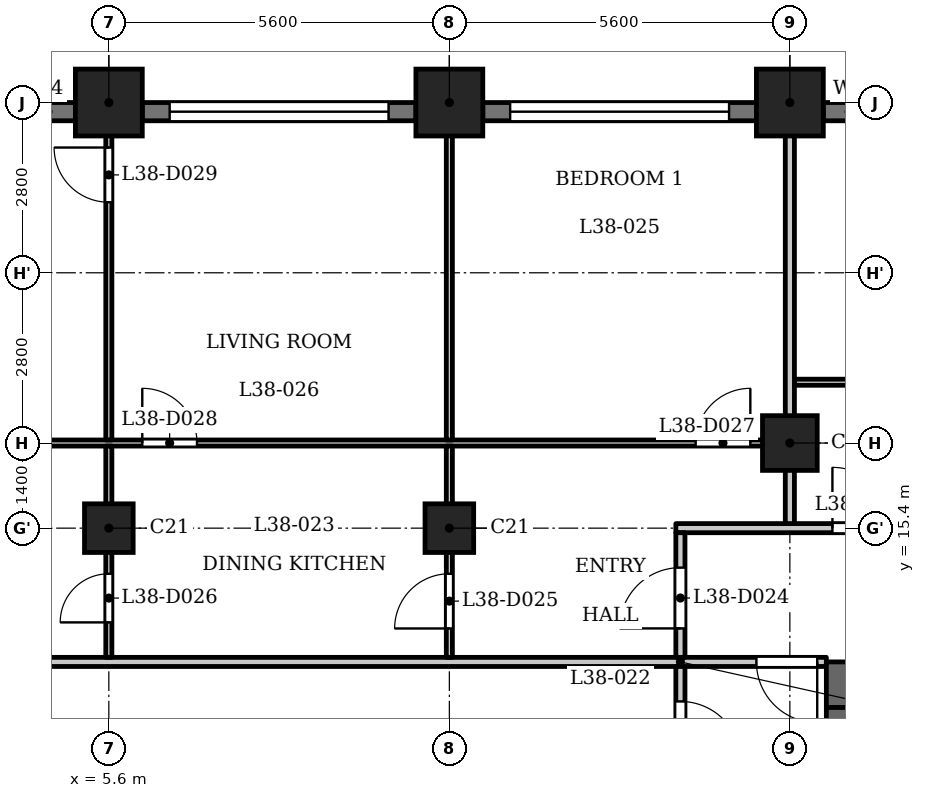
"""IFC4 building model, lengths in metres.
Left out: names, types, materials, properties, quantities, classifications, styles, units other than length and angle.
Written with IfcOpenShell. Run it as: python <this file> out.ifc"""

import sys

from ifc_helpers import new_model, si_unit, direction, frame, frame_2d, origin, origin_2d, place, context, subcontext, project, spatial, rectangle, extrude, element, fill, save


model = new_model("IFC4")
c1 = context("Model", 3, precision=1e-05, world=origin(), true_north=direction((0.0, 1.0)))
c2 = subcontext(c1, "Body", "Model", "MODEL_VIEW")
j1 = project(units=[si_unit("LENGTHUNIT", "METRE"), si_unit("PLANEANGLEUNIT", "RADIAN")], contexts=[c1])
p1 = place(None, origin())
s1 = spatial("IfcSite", under=j1, at=p1, CompositionType="ELEMENT")
p2 = place(p1, origin())
s2 = spatial("IfcBuilding", under=s1, at=p2, CompositionType="ELEMENT")
p3 = place(p2, frame((0.0, 0.0, 150.1)))
s3 = spatial("IfcBuildingStorey", under=s2, at=p3, CompositionType="ELEMENT", Elevation=150.1)
for number, where, z_axis, x_axis in (
    (1, (16.8, 22.4, 0.0), (0.0, 0.0, 1.0), (1.0, 0.0, 0.0)),
    (2, (11.2, 22.4, 0.0), (0.0, 0.0, 1.0), (1.0, 0.0, 0.0)),
    (3, (5.6, 22.4, 0.0), (0.0, 0.0, 1.0), (1.0, 0.0, 0.0)),
):
    element("IfcColumn", number, at=place(p3, frame(where, z_axis=z_axis, x_axis=x_axis)), inside=s3, PredefinedType="COLUMN", context=c2, shape_type="SweptSolid", body=[
        extrude(rectangle(XDim=1.1, YDim=1.1, at=origin_2d()), origin(), (0.0, 0.0, 1.0), 3.5),
    ])
p4 = place(p3, frame((16.8, 16.8, 0.0), z_axis=(0.0, 0.0, 1.0), x_axis=(1.0, 0.0, 0.0)))
e4 = element("IfcColumn", 4, at=p4, inside=s3, PredefinedType="COLUMN", context=c2, shape_type="SweptSolid", body=[
    extrude(rectangle(XDim=0.9, YDim=0.9, at=origin_2d()), origin(), (0.0, 0.0, 1.0), 3.5),
])
for number, where, z_axis, x_axis in (
    (5, (5.6, 15.4, 0.0), (0.0, 0.0, 1.0), (1.0, 0.0, 0.0)),
    (6, (11.2, 15.4, 0.0), (0.0, 0.0, 1.0), (1.0, 0.0, 0.0)),
):
    element("IfcColumn", number, at=place(p3, frame(where, z_axis=z_axis, x_axis=x_axis)), inside=s3, PredefinedType="COLUMN", context=c2, shape_type="SweptSolid", body=[
        extrude(rectangle(XDim=0.8, YDim=0.8, at=origin_2d()), origin(), (0.0, 0.0, 1.0), 3.5),
    ])
p5 = place(p3, frame((20.0, 22.25, 0.0), z_axis=(0.0, 0.0, 1.0), x_axis=(-1.0, 0.0, 0.0)))
e7 = element("IfcWall", 7, at=p5, inside=s3, PredefinedType="SOLIDWALL", context=c2, shape_type="SweptSolid", body=[
    extrude(rectangle(XDim=2.65, YDim=0.3, at=frame_2d((1.325, 0.0))), origin(), (0.0, 0.0, 1.0), 2.45),
])
p6 = place(p5, frame((0.425, 0.0, 0.9)))
e8 = element("IfcOpeningElement", 8, at=p6, cuts=e7, PredefinedType="OPENING", context=c2, shape_type="SweptSolid", body=[
    extrude(rectangle(XDim=1.8, YDim=1.25, at=frame_2d((0.9, 0.625))), frame((0.0, 0.16, 0.0), z_axis=(0.0, -1.0, 0.0), x_axis=(1.0, 0.0, 0.0)), (0.0, 0.0, 1.0), 0.32),
])
p7 = place(p3, frame((16.25, 22.25, 0.0), z_axis=(0.0, 0.0, 1.0), x_axis=(-1.0, 0.0, 0.0)))
e9 = element("IfcWall", 9, at=p7, inside=s3, PredefinedType="SOLIDWALL", context=c2, shape_type="SweptSolid", body=[
    extrude(rectangle(XDim=4.5, YDim=0.3, at=frame_2d((2.25, 0.0))), origin(), (0.0, 0.0, 1.0), 2.45),
])
p8 = place(p7, frame((0.45, 0.0, 1.2)))
e10 = element("IfcOpeningElement", 10, at=p8, cuts=e9, PredefinedType="OPENING", context=c2, shape_type="SweptSolid", body=[
    extrude(rectangle(XDim=3.6, YDim=0.95, at=frame_2d((1.8, 0.475))), frame((0.0, 0.16, 0.0), z_axis=(0.0, -1.0, 0.0), x_axis=(1.0, 0.0, 0.0)), (0.0, 0.0, 1.0), 0.32),
])
p9 = place(p3, frame((10.65, 22.25, 0.0), z_axis=(0.0, 0.0, 1.0), x_axis=(-1.0, 0.0, 0.0)))
e11 = element("IfcWall", 11, at=p9, inside=s3, PredefinedType="SOLIDWALL", context=c2, shape_type="SweptSolid", body=[
    extrude(rectangle(XDim=4.5, YDim=0.3, at=frame_2d((2.25, 0.0))), origin(), (0.0, 0.0, 1.0), 2.45),
])
p10 = place(p9, frame((0.45, 0.0, 1.2)))
e12 = element("IfcOpeningElement", 12, at=p10, cuts=e11, PredefinedType="OPENING", context=c2, shape_type="SweptSolid", body=[
    extrude(rectangle(XDim=3.6, YDim=0.95, at=frame_2d((1.8, 0.475))), frame((0.0, 0.16, 0.0), z_axis=(0.0, -1.0, 0.0), x_axis=(1.0, 0.0, 0.0)), (0.0, 0.0, 1.0), 0.32),
])
p11 = place(p3, frame((5.05, 22.25, 0.0), z_axis=(0.0, 0.0, 1.0), x_axis=(-1.0, 0.0, 0.0)))
e13 = element("IfcWall", 13, at=p11, inside=s3, PredefinedType="SOLIDWALL", context=c2, shape_type="SweptSolid", body=[
    extrude(rectangle(XDim=4.5, YDim=0.3, at=frame_2d((2.25, 0.0))), origin(), (0.0, 0.0, 1.0), 2.45),
])
p12 = place(p11, frame((0.45, 0.0, 1.2)))
e14 = element("IfcOpeningElement", 14, at=p12, cuts=e13, PredefinedType="OPENING", context=c2, shape_type="SweptSolid", body=[
    extrude(rectangle(XDim=3.6, YDim=0.95, at=frame_2d((1.8, 0.475))), frame((0.0, 0.16, 0.0), z_axis=(0.0, -1.0, 0.0), x_axis=(1.0, 0.0, 0.0)), (0.0, 0.0, 1.0), 0.32),
])
p13 = place(p3, frame((17.4, 12.825, 0.0), z_axis=(0.0, 0.0, 1.0), x_axis=(1.0, 0.0, 0.0)))
e15 = element("IfcWall", 15, at=p13, inside=s3, PredefinedType="SHEAR", context=c2, shape_type="SweptSolid", body=[
    extrude(rectangle(XDim=10.4, YDim=0.75, at=frame_2d((5.2, 0.0))), origin(), (0.0, 0.0, 1.0), 3.2),
])
p14 = place(p3, frame((17.6, -12.45, 0.0), z_axis=(0.0, 0.0, 1.0), x_axis=(0.0, 1.0, 0.0)))
e16 = element("IfcWall", 16, at=p14, inside=s3, PredefinedType="SHEAR", context=c2, shape_type="SweptSolid", body=[
    extrude(rectangle(XDim=24.9, YDim=0.4, at=frame_2d((12.45, 0.0))), origin(), (0.0, 0.0, 1.0), 3.2),
])
p15 = place(p14, frame((6.325, 0.0, 0.0)))
e17 = element("IfcOpeningElement", 17, at=p15, cuts=e16, PredefinedType="OPENING", context=c2, shape_type="SweptSolid", body=[
    extrude(rectangle(XDim=0.9, YDim=2.1, at=frame_2d((0.45, 1.05))), frame((0.0, 0.21, 0.0), z_axis=(0.0, -1.0, 0.0), x_axis=(1.0, 0.0, 0.0)), (0.0, 0.0, 1.0), 0.42),
])
p16 = place(p14, frame((9.925, 0.0, 0.0)))
e18 = element("IfcOpeningElement", 18, at=p16, cuts=e16, PredefinedType="OPENING", context=c2, shape_type="SweptSolid", body=[
    extrude(rectangle(XDim=0.9, YDim=2.1, at=frame_2d((0.45, 1.05))), frame((0.0, 0.21, 0.0), z_axis=(0.0, -1.0, 0.0), x_axis=(1.0, 0.0, 0.0)), (0.0, 0.0, 1.0), 0.42),
])
p17 = place(p14, frame((15.6, 0.0, 0.0)))
e19 = element("IfcOpeningElement", 19, at=p17, cuts=e16, PredefinedType="OPENING", context=c2, shape_type="SweptSolid", body=[
    extrude(rectangle(XDim=1.1, YDim=2.1, at=frame_2d((0.55, 1.05))), frame((0.0, 0.21, 0.0), z_axis=(0.0, -1.0, 0.0), x_axis=(1.0, 0.0, 0.0)), (0.0, 0.0, 1.0), 0.42),
])
p18 = place(p14, frame((18.0, 0.0, 0.0)))
e20 = element("IfcOpeningElement", 20, at=p18, cuts=e16, PredefinedType="OPENING", context=c2, shape_type="SweptSolid", body=[
    extrude(rectangle(XDim=1.1, YDim=2.1, at=frame_2d((0.55, 1.05))), frame((0.0, 0.21, 0.0), z_axis=(0.0, -1.0, 0.0), x_axis=(1.0, 0.0, 0.0)), (0.0, 0.0, 1.0), 0.42),
])
p19 = place(p14, frame((23.025, 0.0, 0.0)))
e21 = element("IfcOpeningElement", 21, at=p19, cuts=e16, PredefinedType="OPENING", context=c2, shape_type="SweptSolid", body=[
    extrude(rectangle(XDim=1.1, YDim=2.1, at=frame_2d((0.55, 1.05))), frame((0.0, 0.21, 0.0), z_axis=(0.0, -1.0, 0.0), x_axis=(1.0, 0.0, 0.0)), (0.0, 0.0, 1.0), 0.42),
])
p20 = place(p14, frame((0.775, 0.0, 0.0)))
e22 = element("IfcOpeningElement", 22, at=p20, cuts=e16, PredefinedType="OPENING", context=c2, shape_type="SweptSolid", body=[
    extrude(rectangle(XDim=1.1, YDim=2.1, at=frame_2d((0.55, 1.05))), frame((0.0, 0.21, 0.0), z_axis=(0.0, -1.0, 0.0), x_axis=(1.0, 0.0, 0.0)), (0.0, 0.0, 1.0), 0.42),
])
p21 = place(p14, frame((12.925, 0.0, 0.0)))
e23 = element("IfcOpeningElement", 23, at=p21, cuts=e16, PredefinedType="OPENING", context=c2, shape_type="SweptSolid", body=[
    extrude(rectangle(XDim=1.8, YDim=2.1, at=frame_2d((0.9, 1.05))), frame((0.0, 0.21, 0.0), z_axis=(0.0, -1.0, 0.0), x_axis=(1.0, 0.0, 0.0)), (0.0, 0.0, 1.0), 0.42),
])
p22 = place(p3, frame((-17.4, 13.2, 0.0), z_axis=(0.0, 0.0, 1.0), x_axis=(1.0, 0.0, 0.0)))
e24 = element("IfcWall", 24, at=p22, inside=s3, PredefinedType="PARTITIONING", context=c2, shape_type="SweptSolid", body=[
    extrude(rectangle(XDim=34.8, YDim=0.15, at=frame_2d((17.4, 0.0))), origin(), (0.0, 0.0, 1.0), 3.2),
])
p23 = place(p22, frame((0.25, 0.0, 0.0)))
e25 = element("IfcOpeningElement", 25, at=p23, cuts=e24, PredefinedType="OPENING", context=c2, shape_type="SweptSolid", body=[
    extrude(rectangle(XDim=1.0, YDim=2.1, at=frame_2d((0.5, 1.05))), frame((0.0, 0.085, 0.0), z_axis=(0.0, -1.0, 0.0), x_axis=(1.0, 0.0, 0.0)), (0.0, 0.0, 1.0), 0.17),
])
p24 = place(p22, frame((33.65, 0.0, 0.0)))
e26 = element("IfcOpeningElement", 26, at=p24, cuts=e24, PredefinedType="OPENING", context=c2, shape_type="SweptSolid", body=[
    extrude(rectangle(XDim=1.0, YDim=2.1, at=frame_2d((0.5, 1.05))), frame((0.0, 0.085, 0.0), z_axis=(0.0, -1.0, 0.0), x_axis=(1.0, 0.0, 0.0)), (0.0, 0.0, 1.0), 0.17),
])
p25 = place(p22, frame((13.75, 0.0, 0.0)))
e27 = element("IfcOpeningElement", 27, at=p25, cuts=e24, PredefinedType="OPENING", context=c2, shape_type="SweptSolid", body=[
    extrude(rectangle(XDim=1.0, YDim=2.1, at=frame_2d((0.5, 1.05))), frame((0.0, 0.085, 0.0), z_axis=(0.0, -1.0, 0.0), x_axis=(1.0, 0.0, 0.0)), (0.0, 0.0, 1.0), 0.17),
])
p26 = place(p3, frame((14.925, 15.4, 0.0), z_axis=(0.0, 0.0, 1.0), x_axis=(1.0, 0.0, 0.0)))
e28 = element("IfcWall", 28, at=p26, inside=s3, PredefinedType="PARTITIONING", context=c2, shape_type="SweptSolid", body=[
    extrude(rectangle(XDim=12.559, YDim=0.15, at=frame_2d((6.279, 0.0))), origin(), (0.0, 0.0, 1.0), 3.2),
])
p27 = place(p26, frame((2.575, 0.0, 0.0)))
e29 = element("IfcOpeningElement", 29, at=p27, cuts=e28, PredefinedType="OPENING", context=c2, shape_type="SweptSolid", body=[
    extrude(rectangle(XDim=1.0, YDim=2.1, at=frame_2d((0.5, 1.05))), frame((0.0, 0.085, 0.0), z_axis=(0.0, -1.0, 0.0), x_axis=(1.0, 0.0, 0.0)), (0.0, 0.0, 1.0), 0.17),
])
p28 = place(p3, frame((-16.725, 16.8, 0.0), z_axis=(0.0, 0.0, 1.0), x_axis=(1.0, 0.0, 0.0)))
e30 = element("IfcWall", 30, at=p28, inside=s3, PredefinedType="PARTITIONING", context=c2, shape_type="SweptSolid", body=[
    extrude(rectangle(XDim=33.45, YDim=0.1, at=frame_2d((16.725, 0.0))), origin(), (0.0, 0.0, 1.0), 3.2),
])
p29 = place(p28, frame((9.575, 0.0, 0.0)))
e31 = element("IfcOpeningElement", 31, at=p29, cuts=e30, PredefinedType="OPENING", context=c2, shape_type="SweptSolid", body=[
    extrude(rectangle(XDim=0.8, YDim=2.1, at=frame_2d((0.4, 1.05))), frame((0.0, 0.06, 0.0), z_axis=(0.0, -1.0, 0.0), x_axis=(1.0, 0.0, 0.0)), (0.0, 0.0, 1.0), 0.12),
])
p30 = place(p28, frame((6.125, 0.0, 0.0)))
e32 = element("IfcOpeningElement", 32, at=p30, cuts=e30, PredefinedType="OPENING", context=c2, shape_type="SweptSolid", body=[
    extrude(rectangle(XDim=0.9, YDim=2.1, at=frame_2d((0.45, 1.05))), frame((0.0, 0.06, 0.0), z_axis=(0.0, -1.0, 0.0), x_axis=(1.0, 0.0, 0.0)), (0.0, 0.0, 1.0), 0.12),
])
p31 = place(p28, frame((0.975, 0.0, 0.0)))
e33 = element("IfcOpeningElement", 33, at=p31, cuts=e30, PredefinedType="OPENING", context=c2, shape_type="SweptSolid", body=[
    extrude(rectangle(XDim=0.9, YDim=2.1, at=frame_2d((0.45, 1.05))), frame((0.0, 0.06, 0.0), z_axis=(0.0, -1.0, 0.0), x_axis=(1.0, 0.0, 0.0)), (0.0, 0.0, 1.0), 0.12),
])
p32 = place(p28, frame((3.225, 0.0, 0.0)))
e34 = element("IfcOpeningElement", 34, at=p32, cuts=e30, PredefinedType="OPENING", context=c2, shape_type="SweptSolid", body=[
    extrude(rectangle(XDim=0.9, YDim=2.1, at=frame_2d((0.45, 1.05))), frame((0.0, 0.06, 0.0), z_axis=(0.0, -1.0, 0.0), x_axis=(1.0, 0.0, 0.0)), (0.0, 0.0, 1.0), 0.12),
])
p33 = place(p28, frame((15.375, 0.0, 0.0)))
e35 = element("IfcOpeningElement", 35, at=p33, cuts=e30, PredefinedType="OPENING", context=c2, shape_type="SweptSolid", body=[
    extrude(rectangle(XDim=0.8, YDim=2.1, at=frame_2d((0.4, 1.05))), frame((0.0, 0.06, 0.0), z_axis=(0.0, -1.0, 0.0), x_axis=(1.0, 0.0, 0.0)), (0.0, 0.0, 1.0), 0.12),
])
p34 = place(p28, frame((13.175, 0.0, 0.0)))
e36 = element("IfcOpeningElement", 36, at=p34, cuts=e30, PredefinedType="OPENING", context=c2, shape_type="SweptSolid", body=[
    extrude(rectangle(XDim=0.9, YDim=2.1, at=frame_2d((0.45, 1.05))), frame((0.0, 0.06, 0.0), z_axis=(0.0, -1.0, 0.0), x_axis=(1.0, 0.0, 0.0)), (0.0, 0.0, 1.0), 0.12),
])
p35 = place(p28, frame((31.975, 0.0, 0.0)))
e37 = element("IfcOpeningElement", 37, at=p35, cuts=e30, PredefinedType="OPENING", context=c2, shape_type="SweptSolid", body=[
    extrude(rectangle(XDim=0.9, YDim=2.1, at=frame_2d((0.45, 1.05))), frame((0.0, 0.06, 0.0), z_axis=(0.0, -1.0, 0.0), x_axis=(1.0, 0.0, 0.0)), (0.0, 0.0, 1.0), 0.12),
])
p36 = place(p28, frame((22.875, 0.0, 0.0)))
e38 = element("IfcOpeningElement", 38, at=p36, cuts=e30, PredefinedType="OPENING", context=c2, shape_type="SweptSolid", body=[
    extrude(rectangle(XDim=0.9, YDim=2.1, at=frame_2d((0.45, 1.05))), frame((0.0, 0.06, 0.0), z_axis=(0.0, -1.0, 0.0), x_axis=(1.0, 0.0, 0.0)), (0.0, 0.0, 1.0), 0.12),
])
p37 = place(p3, frame((16.875, 17.8, 0.0), z_axis=(0.0, 0.0, 1.0), x_axis=(1.0, 0.0, 0.0)))
e39 = element("IfcWall", 39, at=p37, inside=s3, PredefinedType="PARTITIONING", context=c2, shape_type="SweptSolid", body=[
    extrude(rectangle(XDim=9.519, YDim=0.1, at=frame_2d((4.76, 0.0))), origin(), (0.0, 0.0, 1.0), 3.2),
])
p38 = place(p37, frame((6.175, 0.0, 0.0)))
e40 = element("IfcOpeningElement", 40, at=p38, cuts=e39, PredefinedType="OPENING", context=c2, shape_type="SweptSolid", body=[
    extrude(rectangle(XDim=0.8, YDim=2.1, at=frame_2d((0.4, 1.05))), frame((0.0, 0.06, 0.0), z_axis=(0.0, -1.0, 0.0), x_axis=(1.0, 0.0, 0.0)), (0.0, 0.0, 1.0), 0.12),
])
p39 = place(p37, frame((1.725, 0.0, 0.0)))
e41 = element("IfcOpeningElement", 41, at=p39, cuts=e39, PredefinedType="OPENING", context=c2, shape_type="SweptSolid", body=[
    extrude(rectangle(XDim=0.9, YDim=2.1, at=frame_2d((0.45, 1.05))), frame((0.0, 0.06, 0.0), z_axis=(0.0, -1.0, 0.0), x_axis=(1.0, 0.0, 0.0)), (0.0, 0.0, 1.0), 0.12),
])
p40 = place(p3, frame((5.6, 13.275, 0.0), z_axis=(0.0, 0.0, 1.0), x_axis=(0.0, 1.0, 0.0)))
e42 = element("IfcWall", 42, at=p40, inside=s3, PredefinedType="PARTITIONING", context=c2, shape_type="SweptSolid", body=[
    extrude(rectangle(XDim=3.475, YDim=0.1, at=frame_2d((1.738, 0.0))), origin(), (0.0, 0.0, 1.0), 3.2),
])
p41 = place(p40, frame((0.575, 0.0, 0.0)))
e43 = element("IfcOpeningElement", 43, at=p41, cuts=e42, PredefinedType="OPENING", context=c2, shape_type="SweptSolid", body=[
    extrude(rectangle(XDim=0.8, YDim=2.1, at=frame_2d((0.4, 1.05))), frame((0.0, 0.06, 0.0), z_axis=(0.0, -1.0, 0.0), x_axis=(1.0, 0.0, 0.0)), (0.0, 0.0, 1.0), 0.12),
])
p42 = place(p3, frame((5.6, 16.85, 0.0), z_axis=(0.0, 0.0, 1.0), x_axis=(0.0, 1.0, 0.0)))
e44 = element("IfcWall", 44, at=p42, inside=s3, PredefinedType="PARTITIONING", context=c2, shape_type="SweptSolid", body=[
    extrude(rectangle(XDim=6.08, YDim=0.1, at=frame_2d((3.04, 0.0))), origin(), (0.0, 0.0, 1.0), 3.2),
])
p43 = place(p42, frame((3.91, 0.0, 0.0)))
e45 = element("IfcOpeningElement", 45, at=p43, cuts=e44, PredefinedType="OPENING", context=c2, shape_type="SweptSolid", body=[
    extrude(rectangle(XDim=0.9, YDim=2.1, at=frame_2d((0.45, 1.05))), frame((0.0, 0.06, 0.0), z_axis=(0.0, -1.0, 0.0), x_axis=(1.0, 0.0, 0.0)), (0.0, 0.0, 1.0), 0.12),
])
p44 = place(p3, frame((11.2, 13.275, 0.0), z_axis=(0.0, 0.0, 1.0), x_axis=(0.0, 1.0, 0.0)))
e46 = element("IfcWall", 46, at=p44, inside=s3, PredefinedType="PARTITIONING", context=c2, shape_type="SweptSolid", body=[
    extrude(rectangle(XDim=3.475, YDim=0.1, at=frame_2d((1.738, 0.0))), origin(), (0.0, 0.0, 1.0), 3.2),
])
p45 = place(p44, frame((0.475, 0.0, 0.0)))
e47 = element("IfcOpeningElement", 47, at=p45, cuts=e46, PredefinedType="OPENING", context=c2, shape_type="SweptSolid", body=[
    extrude(rectangle(XDim=0.9, YDim=2.1, at=frame_2d((0.45, 1.05))), frame((0.0, 0.06, 0.0), z_axis=(0.0, -1.0, 0.0), x_axis=(1.0, 0.0, 0.0)), (0.0, 0.0, 1.0), 0.12),
])
p46 = place(p3, frame((11.2, 16.85, 0.0), z_axis=(0.0, 0.0, 1.0), x_axis=(0.0, 1.0, 0.0)))
e48 = element("IfcWall", 48, at=p46, inside=s3, PredefinedType="PARTITIONING", context=c2, shape_type="SweptSolid", body=[
    extrude(rectangle(XDim=6.08, YDim=0.1, at=frame_2d((3.04, 0.0))), origin(), (0.0, 0.0, 1.0), 3.2),
])
p47 = place(p3, frame((15.0, 6.769, 0.0), z_axis=(0.0, 0.0, 1.0), x_axis=(0.0, 1.0, 0.0)))
e49 = element("IfcWall", 49, at=p47, inside=s3, PredefinedType="PARTITIONING", context=c2, shape_type="SweptSolid", body=[
    extrude(rectangle(XDim=6.356, YDim=0.15, at=frame_2d((3.178, 0.0))), origin(), (0.0, 0.0, 1.0), 3.2),
])
p48 = place(p47, frame((4.781, 0.0, 0.0)))
e50 = element("IfcOpeningElement", 50, at=p48, cuts=e49, PredefinedType="OPENING", context=c2, shape_type="SweptSolid", body=[
    extrude(rectangle(XDim=1.0, YDim=2.1, at=frame_2d((0.5, 1.05))), frame((0.0, 0.085, 0.0), z_axis=(0.0, -1.0, 0.0), x_axis=(1.0, 0.0, 0.0)), (0.0, 0.0, 1.0), 0.17),
])
p49 = place(p3, frame((15.0, 13.275, 0.0), z_axis=(0.0, 0.0, 1.0), x_axis=(0.0, 1.0, 0.0)))
e51 = element("IfcWall", 51, at=p49, inside=s3, PredefinedType="PARTITIONING", context=c2, shape_type="SweptSolid", body=[
    extrude(rectangle(XDim=2.05, YDim=0.15, at=frame_2d((1.025, 0.0))), origin(), (0.0, 0.0, 1.0), 3.2),
])
p50 = place(p49, frame((0.476, 0.0, 0.0)))
e52 = element("IfcOpeningElement", 52, at=p50, cuts=e51, PredefinedType="OPENING", context=c2, shape_type="SweptSolid", body=[
    extrude(rectangle(XDim=1.0, YDim=2.1, at=frame_2d((0.5, 1.05))), frame((0.0, 0.085, 0.0), z_axis=(0.0, -1.0, 0.0), x_axis=(1.0, 0.0, 0.0)), (0.0, 0.0, 1.0), 0.17),
])
p51 = place(p3, frame((16.8, 15.475, 0.0), z_axis=(0.0, 0.0, 1.0), x_axis=(0.0, 1.0, 0.0)))
e53 = element("IfcWall", 53, at=p51, inside=s3, PredefinedType="PARTITIONING", context=c2, shape_type="SweptSolid", body=[
    extrude(rectangle(XDim=7.455, YDim=0.15, at=frame_2d((3.728, 0.0))), origin(), (0.0, 0.0, 1.0), 3.2),
])
p52 = place(p48, origin())
e54 = element("IfcDoor", 54, at=p52, inside=s3, OperationType="SINGLE_SWING_LEFT", PredefinedType="DOOR", context=c2, shape_type="SweptSolid", body=[
    extrude(rectangle(XDim=1.0, YDim=2.1, at=frame_2d((0.5, 1.05))), frame((0.0, 0.025, 0.0), z_axis=(0.0, -1.0, 0.0), x_axis=(1.0, 0.0, 0.0)), (0.0, 0.0, 1.0), 0.05),
])
fill(e50, e54)
p53 = place(p24, origin())
e55 = element("IfcDoor", 55, at=p53, inside=s3, OperationType="SINGLE_SWING_RIGHT", PredefinedType="DOOR", context=c2, shape_type="SweptSolid", body=[
    extrude(rectangle(XDim=1.0, YDim=2.1, at=frame_2d((0.5, 1.05))), frame((0.0, 0.025, 0.0), z_axis=(0.0, -1.0, 0.0), x_axis=(1.0, 0.0, 0.0)), (0.0, 0.0, 1.0), 0.05),
])
fill(e26, e55)
p54 = place(p50, origin())
e56 = element("IfcDoor", 56, at=p54, inside=s3, OperationType="SINGLE_SWING_RIGHT", PredefinedType="DOOR", context=c2, shape_type="SweptSolid", body=[
    extrude(rectangle(XDim=1.0, YDim=2.1, at=frame_2d((0.5, 1.05))), frame((0.0, 0.025, 0.0), z_axis=(0.0, -1.0, 0.0), x_axis=(1.0, 0.0, 0.0)), (0.0, 0.0, 1.0), 0.05),
])
fill(e52, e56)
p55 = place(p45, origin())
e57 = element("IfcDoor", 57, at=p55, inside=s3, OperationType="SINGLE_SWING_RIGHT", PredefinedType="DOOR", context=c2, shape_type="SweptSolid", body=[
    extrude(rectangle(XDim=0.9, YDim=2.1, at=frame_2d((0.45, 1.05))), frame((0.0, 0.025, 0.0), z_axis=(0.0, -1.0, 0.0), x_axis=(1.0, 0.0, 0.0)), (0.0, 0.0, 1.0), 0.05),
])
fill(e47, e57)
p56 = place(p41, origin())
e58 = element("IfcDoor", 58, at=p56, inside=s3, OperationType="SINGLE_SWING_RIGHT", PredefinedType="DOOR", context=c2, shape_type="SweptSolid", body=[
    extrude(rectangle(XDim=0.8, YDim=2.1, at=frame_2d((0.4, 1.05))), frame((0.0, 0.025, 0.0), z_axis=(0.0, -1.0, 0.0), x_axis=(1.0, 0.0, 0.0)), (0.0, 0.0, 1.0), 0.05),
])
fill(e43, e58)
p57 = place(p35, origin())
e59 = element("IfcDoor", 59, at=p57, inside=s3, OperationType="SINGLE_SWING_LEFT", PredefinedType="DOOR", context=c2, shape_type="SweptSolid", body=[
    extrude(rectangle(XDim=0.9, YDim=2.1, at=frame_2d((0.45, 1.05))), frame((0.0, 0.025, 0.0), z_axis=(0.0, -1.0, 0.0), x_axis=(1.0, 0.0, 0.0)), (0.0, 0.0, 1.0), 0.05),
])
fill(e37, e59)
p58 = place(p36, origin())
e60 = element("IfcDoor", 60, at=p58, inside=s3, OperationType="SINGLE_SWING_RIGHT", PredefinedType="DOOR", context=c2, shape_type="SweptSolid", body=[
    extrude(rectangle(XDim=0.9, YDim=2.1, at=frame_2d((0.45, 1.05))), frame((0.0, 0.025, 0.0), z_axis=(0.0, -1.0, 0.0), x_axis=(1.0, 0.0, 0.0)), (0.0, 0.0, 1.0), 0.05),
])
fill(e38, e60)
p59 = place(p43, origin())
e61 = element("IfcDoor", 61, at=p59, inside=s3, OperationType="SINGLE_SWING_LEFT", PredefinedType="DOOR", context=c2, shape_type="SweptSolid", body=[
    extrude(rectangle(XDim=0.9, YDim=2.1, at=frame_2d((0.45, 1.05))), frame((0.0, 0.025, 0.0), z_axis=(0.0, -1.0, 0.0), x_axis=(1.0, 0.0, 0.0)), (0.0, 0.0, 1.0), 0.05),
])
fill(e45, e61)
p60 = place(p27, origin())
e62 = element("IfcDoor", 62, at=p60, inside=s3, OperationType="SINGLE_SWING_RIGHT", PredefinedType="DOOR", context=c2, shape_type="SweptSolid", body=[
    extrude(rectangle(XDim=1.0, YDim=2.1, at=frame_2d((0.5, 1.05))), frame((0.0, 0.025, 0.0), z_axis=(0.0, -1.0, 0.0), x_axis=(1.0, 0.0, 0.0)), (0.0, 0.0, 1.0), 0.05),
])
fill(e29, e62)
p61 = place(p8, origin())
e63 = element("IfcWindow", 63, at=p61, inside=s3, PartitioningType="SINGLE_PANEL", PredefinedType="WINDOW", context=c2, shape_type="SweptSolid", body=[
    extrude(rectangle(XDim=3.6, YDim=0.95, at=frame_2d((1.8, 0.475))), frame((0.0, 0.03, 0.0), z_axis=(0.0, -1.0, 0.0), x_axis=(1.0, 0.0, 0.0)), (0.0, 0.0, 1.0), 0.06),
])
fill(e10, e63)
p62 = place(p10, origin())
e64 = element("IfcWindow", 64, at=p62, inside=s3, PartitioningType="SINGLE_PANEL", PredefinedType="WINDOW", context=c2, shape_type="SweptSolid", body=[
    extrude(rectangle(XDim=3.6, YDim=0.95, at=frame_2d((1.8, 0.475))), frame((0.0, 0.03, 0.0), z_axis=(0.0, -1.0, 0.0), x_axis=(1.0, 0.0, 0.0)), (0.0, 0.0, 1.0), 0.06),
])
fill(e12, e64)
save(model, sys.argv[1])
